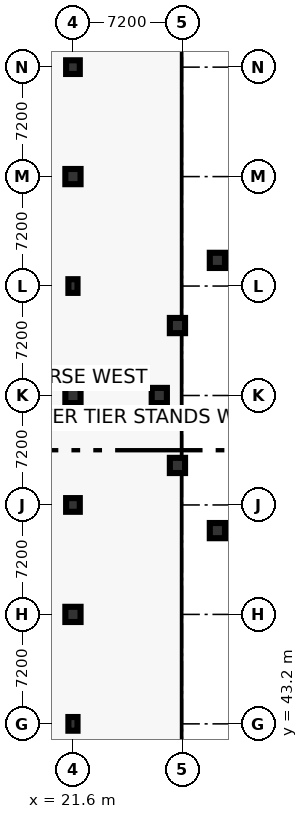
"""IFC4 building model, lengths in metres.
Left out: names, types, materials, properties, quantities, classifications, styles, units other than length and angle.
Written with IfcOpenShell. Run it as: python <this file> out.ifc"""

import sys

from ifc_helpers import new_model, si_unit, direction, frame, origin, origin_2d, place, context, subcontext, project, spatial, rectangle, circle, extrude, element, save


model = new_model("IFC4")
c1 = context("Model", 3, precision=1e-05, world=origin(), true_north=direction((0.0, 1.0)))
c2 = subcontext(c1, "Body", "Model", "MODEL_VIEW")
j1 = project(units=[si_unit("LENGTHUNIT", "METRE"), si_unit("PLANEANGLEUNIT", "RADIAN")], contexts=[c1])
p1 = place(None, origin())
s1 = spatial("IfcSite", under=j1, at=p1, CompositionType="ELEMENT")
p2 = place(p1, origin())
s2 = spatial("IfcBuilding", under=s1, at=p2, CompositionType="ELEMENT")
p3 = place(p2, origin())
s3 = spatial("IfcBuildingStorey", under=s2, at=p3, CompositionType="ELEMENT", Elevation=0.0)
p4 = place(p3, frame((21.6, 43.2, 0.0), z_axis=(0.0, 0.0, 1.0), x_axis=(1.0, 0.0, 0.0)))
e1 = element("IfcColumn", 1, at=p4, inside=s3, PredefinedType="COLUMN", context=c2, shape_type="SweptSolid", body=[
    extrude(rectangle(XDim=0.6, YDim=0.9, at=origin_2d()), origin(), (0.0, 0.0, 1.0), 5.4),
])
p5 = place(p3, frame((21.6, 50.4, 0.0), z_axis=(0.0, 0.0, 1.0), x_axis=(1.0, 0.0, 0.0)))
e2 = element("IfcColumn", 2, at=p5, inside=s3, PredefinedType="COLUMN", context=c2, shape_type="SweptSolid", body=[
    extrude(rectangle(XDim=1.0, YDim=1.0, at=origin_2d()), origin(), (0.0, 0.0, 1.0), 5.4),
])
p6 = place(p3, frame((21.6, 57.6, 0.0), z_axis=(0.0, 0.0, 1.0), x_axis=(1.0, 0.0, 0.0)))
e3 = element("IfcColumn", 3, at=p6, inside=s3, PredefinedType="COLUMN", context=c2, shape_type="SweptSolid", body=[
    extrude(rectangle(XDim=0.9, YDim=0.9, at=origin_2d()), origin(), (0.0, 0.0, 1.0), 5.4),
])
p7 = place(p3, frame((21.6, 64.8, 0.0), z_axis=(0.0, 0.0, 1.0), x_axis=(1.0, 0.0, 0.0)))
e4 = element("IfcColumn", 4, at=p7, inside=s3, PredefinedType="COLUMN", context=c2, shape_type="SweptSolid", body=[
    extrude(circle(Radius=0.5, at=origin_2d()), origin(), (0.0, 0.0, 1.0), 5.4),
])
p8 = place(p3, frame((21.6, 72.0, 0.0), z_axis=(0.0, 0.0, 1.0), x_axis=(1.0, 0.0, 0.0)))
e5 = element("IfcColumn", 5, at=p8, inside=s3, PredefinedType="COLUMN", context=c2, shape_type="SweptSolid", body=[
    extrude(rectangle(XDim=0.6, YDim=0.9, at=origin_2d()), origin(), (0.0, 0.0, 1.0), 5.4),
])
p9 = place(p3, frame((21.6, 79.2, 0.0), z_axis=(0.0, 0.0, 1.0), x_axis=(1.0, 0.0, 0.0)))
e6 = element("IfcColumn", 6, at=p9, inside=s3, PredefinedType="COLUMN", context=c2, shape_type="SweptSolid", body=[
    extrude(rectangle(XDim=1.0, YDim=1.0, at=origin_2d()), origin(), (0.0, 0.0, 1.0), 5.4),
])
p10 = place(p3, frame((21.6, 86.4, 0.0), z_axis=(0.0, 0.0, 1.0), x_axis=(1.0, 0.0, 0.0)))
e7 = element("IfcColumn", 7, at=p10, inside=s3, PredefinedType="COLUMN", context=c2, shape_type="SweptSolid", body=[
    extrude(rectangle(XDim=0.9, YDim=0.9, at=origin_2d()), origin(), (0.0, 0.0, 1.0), 5.4),
])
for number, where, z_axis, x_axis in (
    (8, (31.102, 73.688, 0.0), (0.0, 0.0, 1.0), (1.0, 0.0, 0.0)),
    (9, (28.475, 69.401, 0.0), (0.0, 0.0, 1.0), (1.0, 0.0, 0.0)),
    (10, (27.28, 64.8, 0.0), (0.0, 0.0, 1.0), (1.0, 0.0, 0.0)),
    (11, (28.475, 60.199, 0.0), (0.0, 0.0, 1.0), (1.0, 0.0, 0.0)),
    (12, (31.102, 55.912, 0.0), (0.0, 0.0, 1.0), (1.0, 0.0, 0.0)),
):
    element("IfcColumn", number, at=place(p3, frame(where, z_axis=z_axis, x_axis=x_axis)), inside=s3, PredefinedType="COLUMN", context=c2, shape_type="SweptSolid", body=[
        extrude(circle(Radius=0.5, at=origin_2d()), origin(), (0.0, 0.0, 1.0), 5.4),
    ])
save(model, sys.argv[1])
